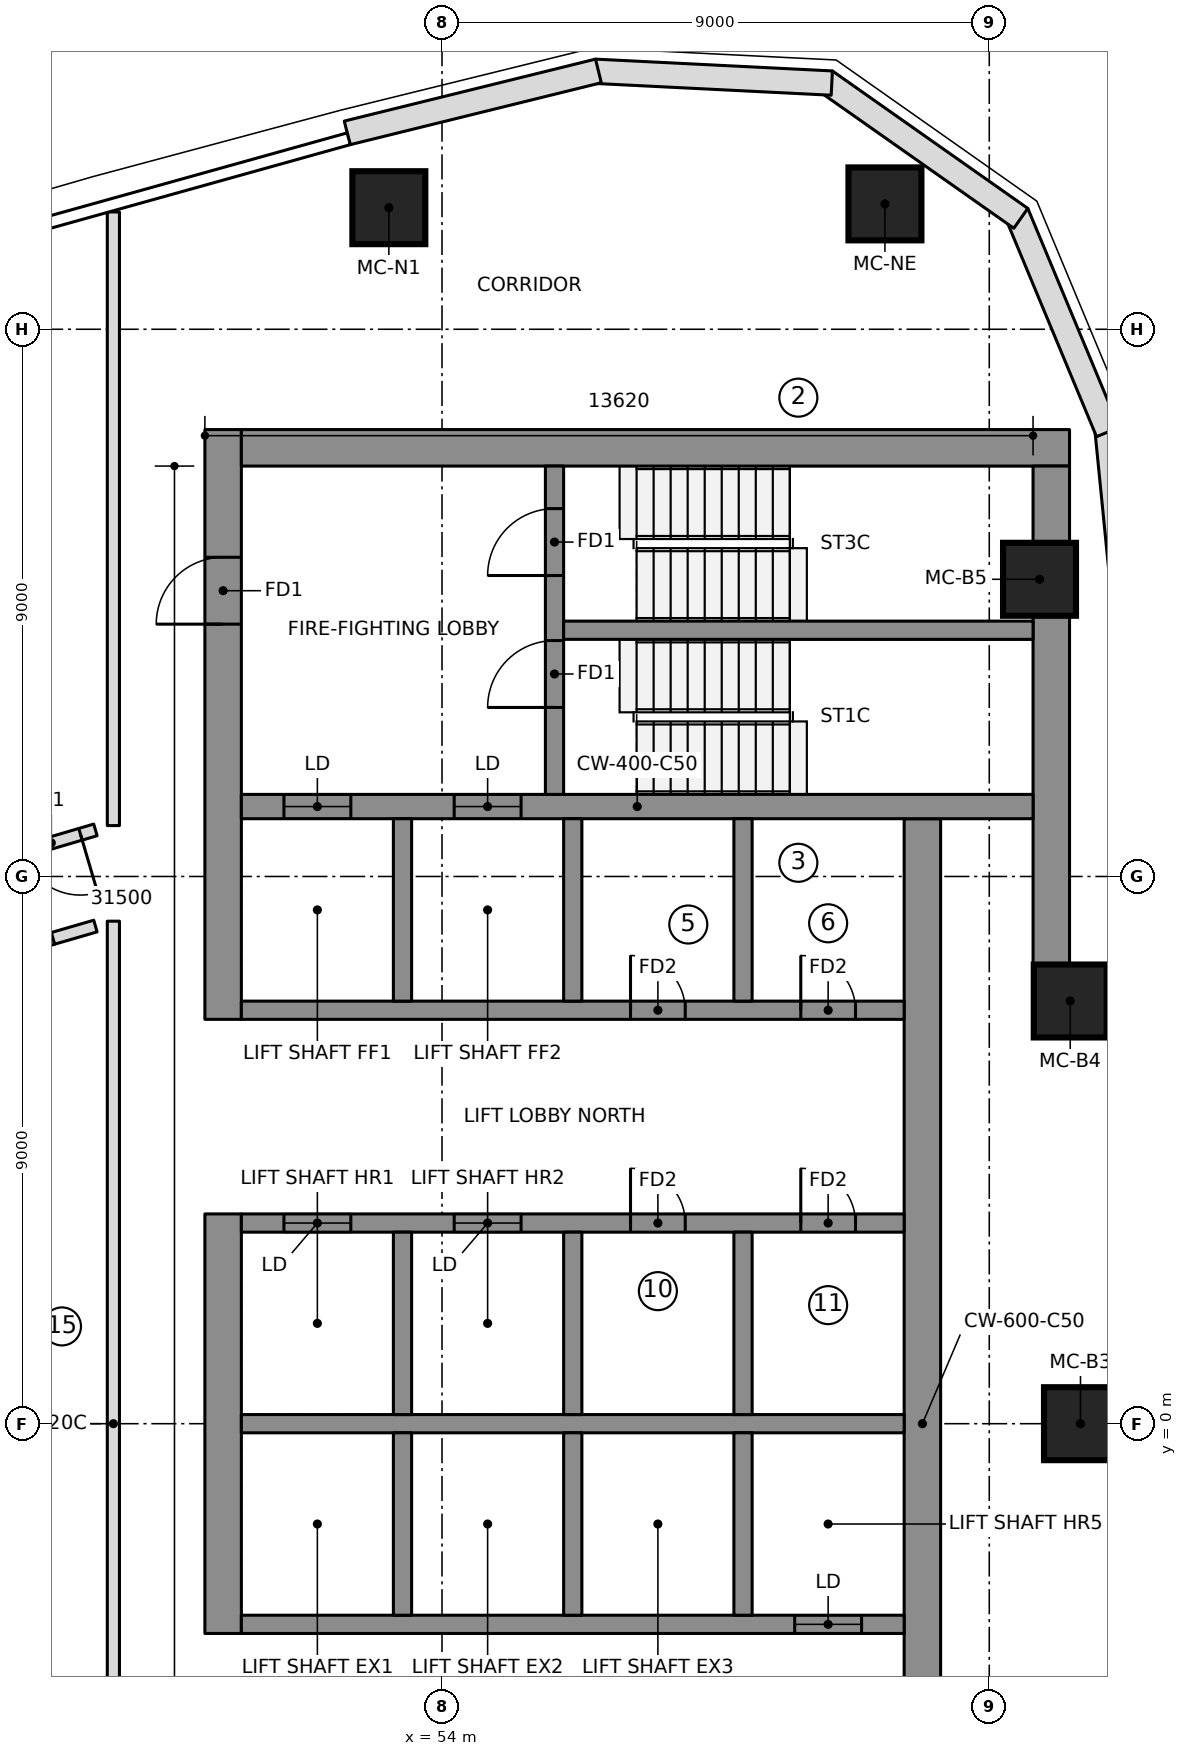
"""IFC4 building model, lengths in metres.
Left out: names, types, materials, properties, quantities, classifications, styles, units other than length and angle.
Written with IfcOpenShell. Run it as: python <this file> out.ifc"""

import sys

from ifc_helpers import new_model, si_unit, direction, frame, frame_2d, origin, origin_2d, place, context, subcontext, project, spatial, polyline, rectangle, outline, extrude, element, fill, save


model = new_model("IFC4")
c1 = context("Model", 3, precision=1e-05, world=origin(), true_north=direction((0.0, 1.0)))
c2 = subcontext(c1, "Body", "Model", "MODEL_VIEW")
j1 = project(units=[si_unit("LENGTHUNIT", "METRE"), si_unit("PLANEANGLEUNIT", "RADIAN")], contexts=[c1])
p1 = place(None, origin())
s1 = spatial("IfcSite", under=j1, at=p1, CompositionType="ELEMENT")
p2 = place(p1, origin())
s2 = spatial("IfcBuilding", under=s1, at=p2, CompositionType="ELEMENT")
p3 = place(p2, frame((0.0, 0.0, 252.75)))
s3 = spatial("IfcBuildingStorey", under=s2, at=p3, CompositionType="ELEMENT", Elevation=252.75)
p4 = place(p3, frame((50.4, 6.65, 0.0), z_axis=(0.0, 0.0, 1.0), x_axis=(0.0, 1.0, 0.0)))
e1 = element("IfcWall", 1, at=p4, inside=s3, PredefinedType="SHEAR", context=c2, shape_type="SweptSolid", body=[
    extrude(rectangle(XDim=9.7, YDim=0.6, at=frame_2d((4.85, 0.0))), origin(), (0.0, 0.0, 1.0), 3.55),
])
p5 = place(p4, frame((6.5, 0.0, 0.0)))
e2 = element("IfcOpeningElement", 2, at=p5, cuts=e1, PredefinedType="OPENING", context=c2, shape_type="SweptSolid", body=[
    extrude(rectangle(XDim=1.1, YDim=2.1, at=frame_2d((0.55, 1.05))), frame((0.0, 0.31, 0.0), z_axis=(0.0, -1.0, 0.0), x_axis=(1.0, 0.0, 0.0)), (0.0, 0.0, 1.0), 0.62),
])
p6 = place(p3, frame((50.4, -3.45, 0.0), z_axis=(0.0, 0.0, 1.0), x_axis=(0.0, 1.0, 0.0)))
e3 = element("IfcWall", 3, at=p6, inside=s3, PredefinedType="SHEAR", context=c2, shape_type="SweptSolid", body=[
    extrude(rectangle(XDim=6.9, YDim=0.6, at=frame_2d((3.45, 0.0))), origin(), (0.0, 0.0, 1.0), 3.55),
])
p7 = place(p3, frame((50.7, 16.05, 0.0), z_axis=(0.0, 0.0, 1.0), x_axis=(1.0, 0.0, 0.0)))
e4 = element("IfcWall", 4, at=p7, inside=s3, PredefinedType="SHEAR", context=c2, shape_type="SweptSolid", body=[
    extrude(rectangle(XDim=13.62, YDim=0.6, at=frame_2d((6.81, 0.0))), origin(), (0.0, 0.0, 1.0), 3.55),
])
p8 = place(p3, frame((64.02, 7.502, 0.0), z_axis=(0.0, 0.0, 1.0), x_axis=(0.0, 1.0, 0.0)))
e5 = element("IfcWall", 5, at=p8, inside=s3, PredefinedType="SHEAR", context=c2, shape_type="SweptSolid", body=[
    extrude(rectangle(XDim=8.248, YDim=0.6, at=frame_2d((4.124, 0.0))), origin(), (0.0, 0.0, 1.0), 3.55),
])
p9 = place(p3, frame((61.9, -9.95, 0.0), z_axis=(0.0, 0.0, 1.0), x_axis=(0.0, 1.0, 0.0)))
e6 = element("IfcWall", 6, at=p9, inside=s3, PredefinedType="SHEAR", context=c2, shape_type="SweptSolid", body=[
    extrude(rectangle(XDim=19.9, YDim=0.6, at=frame_2d((9.95, 0.0))), origin(), (0.0, 0.0, 1.0), 3.55),
])
p10 = place(p3, frame((50.7, 10.15, 0.0), z_axis=(0.0, 0.0, 1.0), x_axis=(1.0, 0.0, 0.0)))
e7 = element("IfcWall", 7, at=p10, inside=s3, PredefinedType="SHEAR", context=c2, shape_type="SweptSolid", body=[
    extrude(rectangle(XDim=13.02, YDim=0.4, at=frame_2d((6.51, 0.0))), origin(), (0.0, 0.0, 1.0), 3.55),
])
p11 = place(p10, frame((0.7, 0.0, 0.0)))
e8 = element("IfcOpeningElement", 8, at=p11, cuts=e7, PredefinedType="OPENING", context=c2, shape_type="SweptSolid", body=[
    extrude(rectangle(XDim=1.1, YDim=2.1, at=frame_2d((0.55, 1.05))), frame((0.0, 0.21, 0.0), z_axis=(0.0, -1.0, 0.0), x_axis=(1.0, 0.0, 0.0)), (0.0, 0.0, 1.0), 0.42),
])
p12 = place(p10, frame((3.5, 0.0, 0.0)))
e9 = element("IfcOpeningElement", 9, at=p12, cuts=e7, PredefinedType="OPENING", context=c2, shape_type="SweptSolid", body=[
    extrude(rectangle(XDim=1.1, YDim=2.1, at=frame_2d((0.55, 1.05))), frame((0.0, 0.21, 0.0), z_axis=(0.0, -1.0, 0.0), x_axis=(1.0, 0.0, 0.0)), (0.0, 0.0, 1.0), 0.42),
])
p13 = place(p3, frame((50.7, 0.0, 0.0), z_axis=(0.0, 0.0, 1.0), x_axis=(1.0, 0.0, 0.0)))
e10 = element("IfcWall", 10, at=p13, inside=s3, PredefinedType="SHEAR", context=c2, shape_type="SweptSolid", body=[
    extrude(rectangle(XDim=10.9, YDim=0.3, at=frame_2d((5.45, 0.0))), origin(), (0.0, 0.0, 1.0), 3.55),
])
p14 = place(p3, frame((50.7, 3.3, 0.0), z_axis=(0.0, 0.0, 1.0), x_axis=(1.0, 0.0, 0.0)))
e11 = element("IfcWall", 11, at=p14, inside=s3, PredefinedType="SHEAR", context=c2, shape_type="SweptSolid", body=[
    extrude(rectangle(XDim=10.9, YDim=0.3, at=frame_2d((5.45, 0.0))), origin(), (0.0, 0.0, 1.0), 3.55),
])
p15 = place(p14, frame((0.7, 0.0, 0.0)))
e12 = element("IfcOpeningElement", 12, at=p15, cuts=e11, PredefinedType="OPENING", context=c2, shape_type="SweptSolid", body=[
    extrude(rectangle(XDim=1.1, YDim=2.1, at=frame_2d((0.55, 1.05))), frame((0.0, 0.16, 0.0), z_axis=(0.0, -1.0, 0.0), x_axis=(1.0, 0.0, 0.0)), (0.0, 0.0, 1.0), 0.32),
])
p16 = place(p14, frame((3.5, 0.0, 0.0)))
e13 = element("IfcOpeningElement", 13, at=p16, cuts=e11, PredefinedType="OPENING", context=c2, shape_type="SweptSolid", body=[
    extrude(rectangle(XDim=1.1, YDim=2.1, at=frame_2d((0.55, 1.05))), frame((0.0, 0.16, 0.0), z_axis=(0.0, -1.0, 0.0), x_axis=(1.0, 0.0, 0.0)), (0.0, 0.0, 1.0), 0.32),
])
p17 = place(p14, frame((6.4, 0.0, 0.0)))
e14 = element("IfcOpeningElement", 14, at=p17, cuts=e11, PredefinedType="OPENING", context=c2, shape_type="SweptSolid", body=[
    extrude(rectangle(XDim=0.9, YDim=2.1, at=frame_2d((0.45, 1.05))), frame((0.0, 0.16, 0.0), z_axis=(0.0, -1.0, 0.0), x_axis=(1.0, 0.0, 0.0)), (0.0, 0.0, 1.0), 0.32),
])
p18 = place(p14, frame((9.2, 0.0, 0.0)))
e15 = element("IfcOpeningElement", 15, at=p18, cuts=e11, PredefinedType="OPENING", context=c2, shape_type="SweptSolid", body=[
    extrude(rectangle(XDim=0.9, YDim=2.1, at=frame_2d((0.45, 1.05))), frame((0.0, 0.16, 0.0), z_axis=(0.0, -1.0, 0.0), x_axis=(1.0, 0.0, 0.0)), (0.0, 0.0, 1.0), 0.32),
])
p19 = place(p3, frame((50.7, 6.8, 0.0), z_axis=(0.0, 0.0, 1.0), x_axis=(1.0, 0.0, 0.0)))
e16 = element("IfcWall", 16, at=p19, inside=s3, PredefinedType="SHEAR", context=c2, shape_type="SweptSolid", body=[
    extrude(rectangle(XDim=10.9, YDim=0.3, at=frame_2d((5.45, 0.0))), origin(), (0.0, 0.0, 1.0), 3.55),
])
p20 = place(p19, frame((6.4, 0.0, 0.0)))
e17 = element("IfcOpeningElement", 17, at=p20, cuts=e16, PredefinedType="OPENING", context=c2, shape_type="SweptSolid", body=[
    extrude(rectangle(XDim=0.9, YDim=2.1, at=frame_2d((0.45, 1.05))), frame((0.0, 0.16, 0.0), z_axis=(0.0, -1.0, 0.0), x_axis=(1.0, 0.0, 0.0)), (0.0, 0.0, 1.0), 0.32),
])
p21 = place(p19, frame((9.2, 0.0, 0.0)))
e18 = element("IfcOpeningElement", 18, at=p21, cuts=e16, PredefinedType="OPENING", context=c2, shape_type="SweptSolid", body=[
    extrude(rectangle(XDim=0.9, YDim=2.1, at=frame_2d((0.45, 1.05))), frame((0.0, 0.16, 0.0), z_axis=(0.0, -1.0, 0.0), x_axis=(1.0, 0.0, 0.0)), (0.0, 0.0, 1.0), 0.32),
])
for number, where, z_axis, x_axis in (
    (19, (53.35, 0.15, 0.0), (0.0, 0.0, 1.0), (0.0, 1.0, 0.0)),
    (20, (53.35, 6.95, 0.0), (0.0, 0.0, 1.0), (0.0, 1.0, 0.0)),
    (21, (56.15, 0.15, 0.0), (0.0, 0.0, 1.0), (0.0, 1.0, 0.0)),
    (22, (56.15, 6.95, 0.0), (0.0, 0.0, 1.0), (0.0, 1.0, 0.0)),
    (23, (58.95, 0.15, 0.0), (0.0, 0.0, 1.0), (0.0, 1.0, 0.0)),
    (24, (58.95, 6.95, 0.0), (0.0, 0.0, 1.0), (0.0, 1.0, 0.0)),
):
    element("IfcWall", number, at=place(p3, frame(where, z_axis=z_axis, x_axis=x_axis)), inside=s3, PredefinedType="SHEAR", context=c2, shape_type="SweptSolid", body=[
        extrude(rectangle(XDim=3.0, YDim=0.3, at=frame_2d((1.5, 0.0))), origin(), (0.0, 0.0, 1.0), 3.55),
    ])
p22 = place(p3, frame((50.7, -3.3, 0.0), z_axis=(0.0, 0.0, 1.0), x_axis=(1.0, 0.0, 0.0)))
e25 = element("IfcWall", 25, at=p22, inside=s3, PredefinedType="SHEAR", context=c2, shape_type="SweptSolid", body=[
    extrude(rectangle(XDim=10.9, YDim=0.3, at=frame_2d((5.45, 0.0))), origin(), (0.0, 0.0, 1.0), 3.55),
])
p23 = place(p22, frame((9.1, 0.0, 0.0)))
e26 = element("IfcOpeningElement", 26, at=p23, cuts=e25, PredefinedType="OPENING", context=c2, shape_type="SweptSolid", body=[
    extrude(rectangle(XDim=1.1, YDim=2.1, at=frame_2d((0.55, 1.05))), frame((0.0, 0.16, 0.0), z_axis=(0.0, -1.0, 0.0), x_axis=(1.0, 0.0, 0.0)), (0.0, 0.0, 1.0), 0.32),
])
for number, where, z_axis, x_axis in (
    (27, (53.35, -3.15, 0.0), (0.0, 0.0, 1.0), (0.0, 1.0, 0.0)),
    (28, (56.15, -3.15, 0.0), (0.0, 0.0, 1.0), (0.0, 1.0, 0.0)),
    (29, (58.95, -3.15, 0.0), (0.0, 0.0, 1.0), (0.0, 1.0, 0.0)),
):
    element("IfcWall", number, at=place(p3, frame(where, z_axis=z_axis, x_axis=x_axis)), inside=s3, PredefinedType="SHEAR", context=c2, shape_type="SweptSolid", body=[
        extrude(rectangle(XDim=3.0, YDim=0.3, at=frame_2d((1.5, 0.0))), origin(), (0.0, 0.0, 1.0), 3.55),
    ])
p24 = place(p3, frame((55.85, 10.35, 0.0), z_axis=(0.0, 0.0, 1.0), x_axis=(0.0, 1.0, 0.0)))
e30 = element("IfcWall", 30, at=p24, inside=s3, PredefinedType="SHEAR", context=c2, shape_type="SweptSolid", body=[
    extrude(rectangle(XDim=5.4, YDim=0.3, at=frame_2d((2.7, 0.0))), origin(), (0.0, 0.0, 1.0), 3.55),
])
p25 = place(p24, frame((1.43, 0.0, 0.0)))
e31 = element("IfcOpeningElement", 31, at=p25, cuts=e30, PredefinedType="OPENING", context=c2, shape_type="SweptSolid", body=[
    extrude(rectangle(XDim=1.1, YDim=2.1, at=frame_2d((0.55, 1.05))), frame((0.0, 0.16, 0.0), z_axis=(0.0, -1.0, 0.0), x_axis=(1.0, 0.0, 0.0)), (0.0, 0.0, 1.0), 0.32),
])
p26 = place(p24, frame((3.6, 0.0, 0.0)))
e32 = element("IfcOpeningElement", 32, at=p26, cuts=e30, PredefinedType="OPENING", context=c2, shape_type="SweptSolid", body=[
    extrude(rectangle(XDim=1.1, YDim=2.1, at=frame_2d((0.55, 1.05))), frame((0.0, 0.16, 0.0), z_axis=(0.0, -1.0, 0.0), x_axis=(1.0, 0.0, 0.0)), (0.0, 0.0, 1.0), 0.32),
])
p27 = place(p3, frame((56.0, 13.05, 0.0), z_axis=(0.0, 0.0, 1.0), x_axis=(1.0, 0.0, 0.0)))
e33 = element("IfcWall", 33, at=p27, inside=s3, PredefinedType="SHEAR", context=c2, shape_type="SweptSolid", body=[
    extrude(rectangle(XDim=7.72, YDim=0.3, at=frame_2d((3.86, 0.0))), origin(), (0.0, 0.0, 1.0), 3.55),
])
for number, where, z_axis, x_axis in (
    (34, (64.5, 0.0, 0.0), (0.0, 0.0, 1.0), (1.0, 0.0, 0.0)),
    (35, (64.332, 6.952, 0.0), (0.0, 0.0, 1.0), (1.0, 0.0, 0.0)),
    (36, (63.826, 13.888, 0.0), (0.0, 0.0, 1.0), (1.0, 0.0, 0.0)),
    (37, (61.284, 20.062, 0.0), (0.0, 0.0, 1.0), (1.0, 0.0, 0.0)),
    (38, (53.125, 20.0, 0.0), (0.0, 0.0, 1.0), (1.0, 0.0, 0.0)),
):
    element("IfcColumn", number, at=place(p3, frame(where, z_axis=z_axis, x_axis=x_axis)), inside=s3, PredefinedType="COLUMN", context=c2, shape_type="SweptSolid", body=[
        extrude(rectangle(XDim=1.2, YDim=1.2, at=origin_2d()), origin(), (0.0, 0.0, 1.0), 3.55),
    ])
p28 = place(p3, frame((65.342, 12.264, 0.0), z_axis=(0.0, 0.0, 1.0), x_axis=(-0.098718218066, 0.995115427185, 0.0)))
e39 = element("IfcWall", 39, at=p28, inside=s3, PredefinedType="NOTDEFINED", context=c2, shape_type="SweptSolid", body=[
    extrude(outline(polyline([(-0.003, -0.2), (4.123, -0.2), (4.063, 0.2), (0.003, 0.2), (-0.003, -0.2)])), origin(), (0.0, 0.0, 1.0), 3.25),
])
p29 = place(p3, frame((64.938, 16.337, 0.0), z_axis=(0.0, 0.0, 1.0), x_axis=(-0.3844335483, 0.923152667191, 0.0)))
e40 = element("IfcWall", 40, at=p29, inside=s3, PredefinedType="NOTDEFINED", context=c2, shape_type="SweptSolid", body=[
    extrude(outline(polyline([(-0.03, -0.2), (3.871, -0.2), (3.756, 0.2), (0.03, 0.2), (-0.03, -0.2)])), origin(), (0.0, 0.0, 1.0), 3.25),
])
p30 = place(p3, frame((63.471, 19.858, 0.0), z_axis=(0.0, 0.0, 1.0), x_axis=(-0.817942545532, 0.575299915009, 0.0)))
e41 = element("IfcWall", 41, at=p30, inside=s3, PredefinedType="NOTDEFINED", context=c2, shape_type="SweptSolid", body=[
    extrude(outline(polyline([(-0.058, -0.2), (3.871, -0.2), (3.756, 0.2), (0.058, 0.2), (-0.058, -0.2)])), origin(), (0.0, 0.0, 1.0), 3.25),
])
p31 = place(p3, frame((60.352, 22.052, 0.0), z_axis=(0.0, 0.0, 1.0), x_axis=(-0.998758875872, 0.049806705046, 0.0)))
e42 = element("IfcWall", 42, at=p31, inside=s3, PredefinedType="NOTDEFINED", context=c2, shape_type="SweptSolid", body=[
    extrude(outline(polyline([(-0.058, -0.2), (3.843, -0.2), (3.784, 0.2), (0.058, 0.2), (-0.058, -0.2)])), origin(), (0.0, 0.0, 1.0), 3.25),
])
p32 = place(p3, frame((56.543, 22.242, 0.0), z_axis=(0.0, 0.0, 1.0), x_axis=(-0.970902342456, -0.23947576373, 0.0)))
e43 = element("IfcWall", 43, at=p32, inside=s3, PredefinedType="NOTDEFINED", context=c2, shape_type="SweptSolid", body=[
    extrude(outline(polyline([(-0.029, -0.2), (4.226, -0.2), (4.226, 0.2), (0.029, 0.2), (-0.029, -0.2)])), origin(), (0.0, 0.0, 1.0), 3.25),
])
p33 = place(p3, frame((46.85, 7.748, 0.0), z_axis=(0.0, 0.0, 1.0), x_axis=(0.95461224237, 0.297851417181, 0.0)))
e44 = element("IfcWall", 44, at=p33, inside=s3, PredefinedType="PARTITIONING", context=c2, shape_type="SweptSolid", body=[
    extrude(rectangle(XDim=0.788, YDim=0.2, at=frame_2d((0.394, 0.0))), origin(), (0.0, 0.0, 1.0), 3.15),
])
p34 = place(p3, frame((48.3, 9.766, 0.0), z_axis=(0.0, 0.0, 1.0), x_axis=(-0.95944263903, -0.281903924079, 0.0)))
e45 = element("IfcWall", 45, at=p34, inside=s3, PredefinedType="PARTITIONING", context=c2, shape_type="SweptSolid", body=[
    extrude(rectangle(XDim=1.511, YDim=0.2, at=frame_2d((0.756, 0.0))), origin(), (0.0, 0.0, 1.0), 3.15),
])
p35 = place(p34, frame((0.256, 0.0, 0.0)))
e46 = element("IfcOpeningElement", 46, at=p35, cuts=e45, PredefinedType="OPENING", context=c2, shape_type="SweptSolid", body=[
    extrude(rectangle(XDim=1.0, YDim=2.1, at=frame_2d((0.5, 1.05))), frame((0.0, 0.11, 0.0), z_axis=(0.0, -1.0, 0.0), x_axis=(1.0, 0.0, 0.0)), (0.0, 0.0, 1.0), 0.22),
])
p36 = place(p3, frame((47.602, 7.982, 0.0), z_axis=(0.0, 0.0, 1.0), x_axis=(0.960439023181, 0.278490363839, 0.0)))
e47 = element("IfcWall", 47, at=p36, inside=s3, PredefinedType="PARTITIONING", context=c2, shape_type="SweptSolid", body=[
    extrude(rectangle(XDim=0.727, YDim=0.2, at=frame_2d((0.363, 0.0))), origin(), (0.0, 0.0, 1.0), 3.15),
])
p37 = place(p3, frame((48.595, 8.265, 0.0), z_axis=(0.0, 0.0, 1.0), x_axis=(0.0, -1.0, 0.0)))
e48 = element("IfcWall", 48, at=p37, inside=s3, PredefinedType="PARTITIONING", context=c2, shape_type="SweptSolid", body=[
    extrude(rectangle(XDim=16.53, YDim=0.2, at=frame_2d((8.265, 0.0))), origin(), (0.0, 0.0, 1.0), 3.15),
])
p38 = place(p3, frame((48.595, 19.929, 0.0), z_axis=(0.0, 0.0, 1.0), x_axis=(0.0, -1.0, 0.0)))
e49 = element("IfcWall", 49, at=p38, inside=s3, PredefinedType="PARTITIONING", context=c2, shape_type="SweptSolid", body=[
    extrude(rectangle(XDim=10.093, YDim=0.2, at=frame_2d((5.046, 0.0))), origin(), (0.0, 0.0, 1.0), 3.15),
])
p39 = place(p35, origin())
e50 = element("IfcDoor", 50, at=p39, inside=s3, OperationType="SINGLE_SWING_LEFT", PredefinedType="DOOR", context=c2, shape_type="SweptSolid", body=[
    extrude(rectangle(XDim=1.0, YDim=2.1, at=frame_2d((0.5, 1.05))), frame((0.0, 0.025, 0.0), z_axis=(0.0, -1.0, 0.0), x_axis=(1.0, 0.0, 0.0)), (0.0, 0.0, 1.0), 0.05),
])
fill(e46, e50)
p40 = place(p11, origin())
e51 = element("IfcDoor", 51, at=p40, inside=s3, OperationType="DOUBLE_DOOR_SLIDING", PredefinedType="DOOR", context=c2, shape_type="SweptSolid", body=[
    extrude(rectangle(XDim=1.1, YDim=2.1, at=frame_2d((0.55, 1.05))), frame((0.0, 0.025, 0.0), z_axis=(0.0, -1.0, 0.0), x_axis=(1.0, 0.0, 0.0)), (0.0, 0.0, 1.0), 0.05),
])
fill(e8, e51)
p41 = place(p12, origin())
e52 = element("IfcDoor", 52, at=p41, inside=s3, OperationType="DOUBLE_DOOR_SLIDING", PredefinedType="DOOR", context=c2, shape_type="SweptSolid", body=[
    extrude(rectangle(XDim=1.1, YDim=2.1, at=frame_2d((0.55, 1.05))), frame((0.0, 0.025, 0.0), z_axis=(0.0, -1.0, 0.0), x_axis=(1.0, 0.0, 0.0)), (0.0, 0.0, 1.0), 0.05),
])
fill(e9, e52)
p42 = place(p15, origin())
e53 = element("IfcDoor", 53, at=p42, inside=s3, OperationType="DOUBLE_DOOR_SLIDING", PredefinedType="DOOR", context=c2, shape_type="SweptSolid", body=[
    extrude(rectangle(XDim=1.1, YDim=2.1, at=frame_2d((0.55, 1.05))), frame((0.0, 0.025, 0.0), z_axis=(0.0, -1.0, 0.0), x_axis=(1.0, 0.0, 0.0)), (0.0, 0.0, 1.0), 0.05),
])
fill(e12, e53)
p43 = place(p16, origin())
e54 = element("IfcDoor", 54, at=p43, inside=s3, OperationType="DOUBLE_DOOR_SLIDING", PredefinedType="DOOR", context=c2, shape_type="SweptSolid", body=[
    extrude(rectangle(XDim=1.1, YDim=2.1, at=frame_2d((0.55, 1.05))), frame((0.0, 0.025, 0.0), z_axis=(0.0, -1.0, 0.0), x_axis=(1.0, 0.0, 0.0)), (0.0, 0.0, 1.0), 0.05),
])
fill(e13, e54)
p44 = place(p23, origin())
e55 = element("IfcDoor", 55, at=p44, inside=s3, OperationType="DOUBLE_DOOR_SLIDING", PredefinedType="DOOR", context=c2, shape_type="SweptSolid", body=[
    extrude(rectangle(XDim=1.1, YDim=2.1, at=frame_2d((0.55, 1.05))), frame((0.0, 0.025, 0.0), z_axis=(0.0, -1.0, 0.0), x_axis=(1.0, 0.0, 0.0)), (0.0, 0.0, 1.0), 0.05),
])
fill(e26, e55)
p45 = place(p25, origin())
e56 = element("IfcDoor", 56, at=p45, inside=s3, OperationType="SINGLE_SWING_RIGHT", PredefinedType="DOOR", context=c2, shape_type="SweptSolid", body=[
    extrude(rectangle(XDim=1.1, YDim=2.1, at=frame_2d((0.55, 1.05))), frame((0.0, 0.025, 0.0), z_axis=(0.0, -1.0, 0.0), x_axis=(1.0, 0.0, 0.0)), (0.0, 0.0, 1.0), 0.05),
])
fill(e31, e56)
p46 = place(p26, origin())
e57 = element("IfcDoor", 57, at=p46, inside=s3, OperationType="SINGLE_SWING_RIGHT", PredefinedType="DOOR", context=c2, shape_type="SweptSolid", body=[
    extrude(rectangle(XDim=1.1, YDim=2.1, at=frame_2d((0.55, 1.05))), frame((0.0, 0.025, 0.0), z_axis=(0.0, -1.0, 0.0), x_axis=(1.0, 0.0, 0.0)), (0.0, 0.0, 1.0), 0.05),
])
fill(e32, e57)
p47 = place(p5, origin())
e58 = element("IfcDoor", 58, at=p47, inside=s3, OperationType="SINGLE_SWING_RIGHT", PredefinedType="DOOR", context=c2, shape_type="SweptSolid", body=[
    extrude(rectangle(XDim=1.1, YDim=2.1, at=frame_2d((0.55, 1.05))), frame((0.0, 0.025, 0.0), z_axis=(0.0, -1.0, 0.0), x_axis=(1.0, 0.0, 0.0)), (0.0, 0.0, 1.0), 0.05),
])
fill(e2, e58)
p48 = place(p20, origin())
e59 = element("IfcDoor", 59, at=p48, inside=s3, OperationType="SINGLE_SWING_LEFT", PredefinedType="DOOR", context=c2, shape_type="SweptSolid", body=[
    extrude(rectangle(XDim=0.9, YDim=2.1, at=frame_2d((0.45, 1.05))), frame((0.0, 0.025, 0.0), z_axis=(0.0, -1.0, 0.0), x_axis=(1.0, 0.0, 0.0)), (0.0, 0.0, 1.0), 0.05),
])
fill(e17, e59)
p49 = place(p21, origin())
e60 = element("IfcDoor", 60, at=p49, inside=s3, OperationType="SINGLE_SWING_LEFT", PredefinedType="DOOR", context=c2, shape_type="SweptSolid", body=[
    extrude(rectangle(XDim=0.9, YDim=2.1, at=frame_2d((0.45, 1.05))), frame((0.0, 0.025, 0.0), z_axis=(0.0, -1.0, 0.0), x_axis=(1.0, 0.0, 0.0)), (0.0, 0.0, 1.0), 0.05),
])
fill(e18, e60)
p50 = place(p17, origin())
e61 = element("IfcDoor", 61, at=p50, inside=s3, OperationType="SINGLE_SWING_LEFT", PredefinedType="DOOR", context=c2, shape_type="SweptSolid", body=[
    extrude(rectangle(XDim=0.9, YDim=2.1, at=frame_2d((0.45, 1.05))), frame((0.0, 0.025, 0.0), z_axis=(0.0, -1.0, 0.0), x_axis=(1.0, 0.0, 0.0)), (0.0, 0.0, 1.0), 0.05),
])
fill(e14, e61)
p51 = place(p18, origin())
e62 = element("IfcDoor", 62, at=p51, inside=s3, OperationType="SINGLE_SWING_LEFT", PredefinedType="DOOR", context=c2, shape_type="SweptSolid", body=[
    extrude(rectangle(XDim=0.9, YDim=2.1, at=frame_2d((0.45, 1.05))), frame((0.0, 0.025, 0.0), z_axis=(0.0, -1.0, 0.0), x_axis=(1.0, 0.0, 0.0)), (0.0, 0.0, 1.0), 0.05),
])
fill(e15, e62)
save(model, sys.argv[1])
